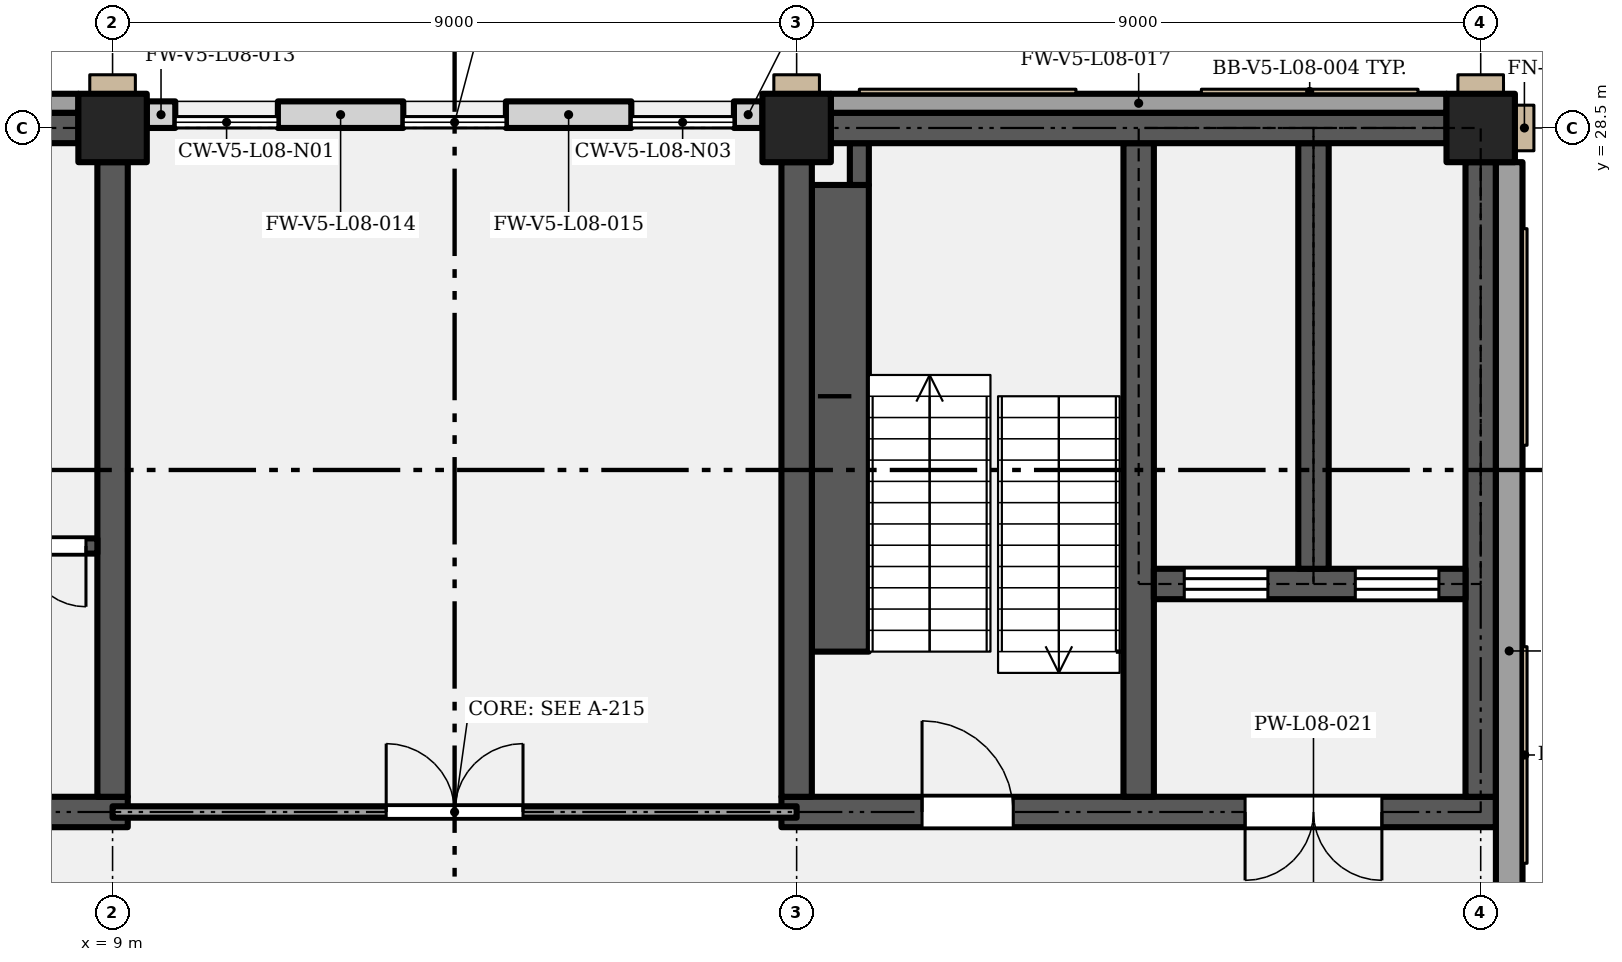
"""IFC4 building model, lengths in metres.
Left out: names, types, materials, properties, quantities, classifications, styles, units other than length and angle.
Written with IfcOpenShell. Run it as: python <this file> out.ifc"""

import sys

from ifc_helpers import new_model, si_unit, direction, frame, frame_2d, origin, origin_2d, place, context, subcontext, project, spatial, rectangle, extrude, element, fill, save


model = new_model("IFC4")
c1 = context("Model", 3, precision=1e-05, world=origin(), true_north=direction((0.0, 1.0)))
c2 = subcontext(c1, "Body", "Model", "MODEL_VIEW")
j1 = project(units=[si_unit("LENGTHUNIT", "METRE"), si_unit("PLANEANGLEUNIT", "RADIAN")], contexts=[c1])
p1 = place(None, origin())
s1 = spatial("IfcSite", under=j1, at=p1, CompositionType="ELEMENT")
p2 = place(p1, origin())
s2 = spatial("IfcBuilding", under=s1, at=p2, CompositionType="ELEMENT")
p3 = place(p2, frame((0.0, 0.0, 44.4)))
s3 = spatial("IfcBuildingStorey", under=s2, at=p3, CompositionType="ELEMENT", Elevation=44.4)
for number, where, z_axis, x_axis in (
    (1, (9.0, 28.5, 0.0), (0.0, 0.0, 1.0), (1.0, 0.0, 0.0)),
    (2, (18.0, 28.5, 0.0), (0.0, 0.0, 1.0), (1.0, 0.0, 0.0)),
    (3, (27.0, 28.5, 0.0), (0.0, 0.0, 1.0), (1.0, 0.0, 0.0)),
):
    element("IfcColumn", number, at=place(p3, frame(where, z_axis=z_axis, x_axis=x_axis)), inside=s3, PredefinedType="COLUMN", context=c2, shape_type="SweptSolid", body=[
        extrude(rectangle(XDim=0.9, YDim=0.9, at=origin_2d()), origin(), (0.0, 0.0, 1.0), 4.5),
    ])
p4 = place(p3, frame((-0.2, 19.5, 0.0), z_axis=(0.0, 0.0, 1.0), x_axis=(1.0, 0.0, 0.0)))
e4 = element("IfcWall", 4, at=p4, inside=s3, PredefinedType="SHEAR", context=c2, shape_type="SweptSolid", body=[
    extrude(rectangle(XDim=9.4, YDim=0.4, at=frame_2d((4.7, 0.0))), origin(), (0.0, 0.0, 1.0), 4.25),
])
p5 = place(p4, frame((1.85, 0.0, 0.0)))
e5 = element("IfcOpeningElement", 5, at=p5, cuts=e4, PredefinedType="OPENING", context=c2, shape_type="SweptSolid", body=[
    extrude(rectangle(XDim=1.2, YDim=2.1, at=frame_2d((0.6, 1.05))), frame((0.0, 0.21, 0.0), z_axis=(0.0, -1.0, 0.0), x_axis=(1.0, 0.0, 0.0)), (0.0, 0.0, 1.0), 0.42),
])
p6 = place(p4, frame((6.35, 0.0, 0.0)))
e6 = element("IfcOpeningElement", 6, at=p6, cuts=e4, PredefinedType="OPENING", context=c2, shape_type="SweptSolid", body=[
    extrude(rectangle(XDim=1.2, YDim=2.1, at=frame_2d((0.6, 1.05))), frame((0.0, 0.21, 0.0), z_axis=(0.0, -1.0, 0.0), x_axis=(1.0, 0.0, 0.0)), (0.0, 0.0, 1.0), 0.42),
])
p7 = place(p3, frame((17.8, 19.5, 0.0), z_axis=(0.0, 0.0, 1.0), x_axis=(1.0, 0.0, 0.0)))
e7 = element("IfcWall", 7, at=p7, inside=s3, PredefinedType="SHEAR", context=c2, shape_type="SweptSolid", body=[
    extrude(rectangle(XDim=9.4, YDim=0.4, at=frame_2d((4.7, 0.0))), origin(), (0.0, 0.0, 1.0), 4.25),
])
p8 = place(p7, frame((1.85, 0.0, 0.0)))
e8 = element("IfcOpeningElement", 8, at=p8, cuts=e7, PredefinedType="OPENING", context=c2, shape_type="SweptSolid", body=[
    extrude(rectangle(XDim=1.2, YDim=2.1, at=frame_2d((0.6, 1.05))), frame((0.0, 0.21, 0.0), z_axis=(0.0, -1.0, 0.0), x_axis=(1.0, 0.0, 0.0)), (0.0, 0.0, 1.0), 0.42),
])
p9 = place(p7, frame((7.9, 0.0, 0.0), z_axis=(0.0, 0.0, 1.0), x_axis=(-1.0, 0.0, 0.0)))
e9 = element("IfcOpeningElement", 9, at=p9, cuts=e7, PredefinedType="OPENING", context=c2, shape_type="SweptSolid", body=[
    extrude(rectangle(XDim=1.8, YDim=2.1, at=frame_2d((0.9, 1.05))), frame((0.0, 0.21, 0.0), z_axis=(0.0, -1.0, 0.0), x_axis=(1.0, 0.0, 0.0)), (0.0, 0.0, 1.0), 0.42),
])
for number, where, z_axis, x_axis in (
    (10, (9.0, 19.7, 0.0), (0.0, 0.0, 1.0), (0.0, 1.0, 0.0)),
    (11, (18.0, 19.7, 0.0), (0.0, 0.0, 1.0), (0.0, 1.0, 0.0)),
):
    element("IfcWall", number, at=place(p3, frame(where, z_axis=z_axis, x_axis=x_axis)), inside=s3, PredefinedType="SHEAR", context=c2, shape_type="SweptSolid", body=[
        extrude(rectangle(XDim=8.35, YDim=0.4, at=frame_2d((4.175, 0.0))), origin(), (0.0, 0.0, 1.0), 4.25),
    ])
p10 = place(p3, frame((22.5, 19.7, 0.0), z_axis=(0.0, 0.0, 1.0), x_axis=(0.0, 1.0, 0.0)))
e12 = element("IfcWall", 12, at=p10, inside=s3, PredefinedType="SHEAR", context=c2, shape_type="SweptSolid", body=[
    extrude(rectangle(XDim=8.6, YDim=0.4, at=frame_2d((4.3, 0.0))), origin(), (0.0, 0.0, 1.0), 4.25),
])
p11 = place(p3, frame((27.0, 19.7, 0.0), z_axis=(0.0, 0.0, 1.0), x_axis=(0.0, 1.0, 0.0)))
e13 = element("IfcWall", 13, at=p11, inside=s3, PredefinedType="SHEAR", context=c2, shape_type="SweptSolid", body=[
    extrude(rectangle(XDim=8.35, YDim=0.4, at=frame_2d((4.175, 0.0))), origin(), (0.0, 0.0, 1.0), 4.25),
])
p12 = place(p3, frame((22.7, 22.5, 0.0), z_axis=(0.0, 0.0, 1.0), x_axis=(1.0, 0.0, 0.0)))
e14 = element("IfcWall", 14, at=p12, inside=s3, PredefinedType="SHEAR", context=c2, shape_type="SweptSolid", body=[
    extrude(rectangle(XDim=4.1, YDim=0.4, at=frame_2d((2.05, 0.0))), origin(), (0.0, 0.0, 1.0), 4.25),
])
p13 = place(p12, frame((0.4, 0.0, 0.0)))
e15 = element("IfcOpeningElement", 15, at=p13, cuts=e14, PredefinedType="OPENING", context=c2, shape_type="SweptSolid", body=[
    extrude(rectangle(XDim=1.1, YDim=2.1, at=frame_2d((0.55, 1.05))), frame((0.0, 0.21, 0.0), z_axis=(0.0, -1.0, 0.0), x_axis=(1.0, 0.0, 0.0)), (0.0, 0.0, 1.0), 0.42),
])
p14 = place(p12, frame((2.65, 0.0, 0.0)))
e16 = element("IfcOpeningElement", 16, at=p14, cuts=e14, PredefinedType="OPENING", context=c2, shape_type="SweptSolid", body=[
    extrude(rectangle(XDim=1.1, YDim=2.1, at=frame_2d((0.55, 1.05))), frame((0.0, 0.21, 0.0), z_axis=(0.0, -1.0, 0.0), x_axis=(1.0, 0.0, 0.0)), (0.0, 0.0, 1.0), 0.42),
])
p15 = place(p3, frame((24.8, 22.7, 0.0), z_axis=(0.0, 0.0, 1.0), x_axis=(0.0, 1.0, 0.0)))
e17 = element("IfcWall", 17, at=p15, inside=s3, PredefinedType="SHEAR", context=c2, shape_type="SweptSolid", body=[
    extrude(rectangle(XDim=5.6, YDim=0.4, at=frame_2d((2.8, 0.0))), origin(), (0.0, 0.0, 1.0), 4.25),
])
for number, where, z_axis, x_axis in (
    (18, (0.45, 28.5, 0.0), (0.0, 0.0, 1.0), (1.0, 0.0, 0.0)),
    (19, (18.45, 28.5, 0.0), (0.0, 0.0, 1.0), (1.0, 0.0, 0.0)),
):
    element("IfcWall", number, at=place(p3, frame(where, z_axis=z_axis, x_axis=x_axis)), inside=s3, PredefinedType="SHEAR", context=c2, shape_type="SweptSolid", body=[
        extrude(rectangle(XDim=8.1, YDim=0.4, at=frame_2d((4.05, 0.0))), origin(), (0.0, 0.0, 1.0), 4.25),
    ])
p16 = place(p3, frame((0.45, 28.825, 0.0), z_axis=(0.0, 0.0, 1.0), x_axis=(1.0, 0.0, 0.0)))
e20 = element("IfcWall", 20, at=p16, inside=s3, PredefinedType="SOLIDWALL", context=c2, shape_type="SweptSolid", body=[
    extrude(rectangle(XDim=8.1, YDim=0.25, at=frame_2d((4.05, 0.0))), origin(), (0.0, 0.0, 1.0), 4.25),
])
p17 = place(p3, frame((9.45, 28.675, 0.0), z_axis=(0.0, 0.0, 1.0), x_axis=(1.0, 0.0, 0.0)))
e21 = element("IfcWall", 21, at=p17, inside=s3, PredefinedType="SOLIDWALL", context=c2, shape_type="SweptSolid", body=[
    extrude(rectangle(XDim=0.375, YDim=0.35, at=frame_2d((0.188, 0.0))), origin(), (0.0, 0.0, 1.0), 4.25),
])
for number, where, z_axis, x_axis in (
    (22, (11.175, 28.675, 0.0), (0.0, 0.0, 1.0), (1.0, 0.0, 0.0)),
    (23, (14.175, 28.675, 0.0), (0.0, 0.0, 1.0), (1.0, 0.0, 0.0)),
):
    element("IfcWall", number, at=place(p3, frame(where, z_axis=z_axis, x_axis=x_axis)), inside=s3, PredefinedType="SOLIDWALL", context=c2, shape_type="SweptSolid", body=[
        extrude(rectangle(XDim=1.65, YDim=0.35, at=frame_2d((0.825, 0.0))), origin(), (0.0, 0.0, 1.0), 4.25),
    ])
p18 = place(p3, frame((17.175, 28.675, 0.0), z_axis=(0.0, 0.0, 1.0), x_axis=(1.0, 0.0, 0.0)))
e24 = element("IfcWall", 24, at=p18, inside=s3, PredefinedType="SOLIDWALL", context=c2, shape_type="SweptSolid", body=[
    extrude(rectangle(XDim=0.375, YDim=0.35, at=frame_2d((0.188, 0.0))), origin(), (0.0, 0.0, 1.0), 4.25),
])
p19 = place(p3, frame((18.45, 28.825, 0.0), z_axis=(0.0, 0.0, 1.0), x_axis=(1.0, 0.0, 0.0)))
e25 = element("IfcWall", 25, at=p19, inside=s3, PredefinedType="SOLIDWALL", context=c2, shape_type="SweptSolid", body=[
    extrude(rectangle(XDim=8.1, YDim=0.25, at=frame_2d((4.05, 0.0))), origin(), (0.0, 0.0, 1.0), 4.25),
])
p20 = place(p3, frame((27.375, 15.188, 0.0), z_axis=(0.0, 0.0, 1.0), x_axis=(0.0, 1.0, 0.0)))
e26 = element("IfcWall", 26, at=p20, inside=s3, PredefinedType="SOLIDWALL", context=c2, shape_type="SweptSolid", body=[
    extrude(rectangle(XDim=12.863, YDim=0.35, at=frame_2d((6.431, 0.0))), origin(), (0.0, 0.0, 1.0), 4.25),
])
p21 = place(p3, frame((9.0, 19.5, 0.0), z_axis=(0.0, 0.0, 1.0), x_axis=(1.0, 0.0, 0.0)))
e27 = element("IfcWall", 27, at=p21, inside=s3, PredefinedType="PARTITIONING", context=c2, shape_type="SweptSolid", body=[
    extrude(rectangle(XDim=9.0, YDim=0.15, at=frame_2d((4.5, 0.0))), origin(), (0.0, 0.0, 1.0), 4.25),
])
p22 = place(p21, frame((3.6, 0.0, 0.0)))
e28 = element("IfcOpeningElement", 28, at=p22, cuts=e27, PredefinedType="OPENING", context=c2, shape_type="SweptSolid", body=[
    extrude(rectangle(XDim=1.8, YDim=2.1, at=frame_2d((0.9, 1.05))), frame((0.0, 0.085, 0.0), z_axis=(0.0, -1.0, 0.0), x_axis=(1.0, 0.0, 0.0)), (0.0, 0.0, 1.0), 0.17),
])
p23 = place(p3, frame((7.5, 23.0, 0.0), z_axis=(0.0, 0.0, 1.0), x_axis=(1.0, 0.0, 0.0)))
e29 = element("IfcWall", 29, at=p23, inside=s3, PredefinedType="SHEAR", context=c2, shape_type="SweptSolid", body=[
    extrude(rectangle(XDim=1.3, YDim=0.2, at=frame_2d((0.65, 0.0))), origin(), (0.0, 0.0, 1.0), 4.25),
])
p24 = place(p23, frame((1.15, 0.0, 0.0), z_axis=(0.0, 0.0, 1.0), x_axis=(-1.0, 0.0, 0.0)))
e30 = element("IfcOpeningElement", 30, at=p24, cuts=e29, PredefinedType="OPENING", context=c2, shape_type="SweptSolid", body=[
    extrude(rectangle(XDim=0.8, YDim=2.0, at=frame_2d((0.4, 1.0))), frame((0.0, 0.11, 0.0), z_axis=(0.0, -1.0, 0.0), x_axis=(1.0, 0.0, 0.0)), (0.0, 0.0, 1.0), 0.22),
])
p25 = place(p3, frame((18.575, 21.61, 0.0), z_axis=(0.0, 0.0, 1.0), x_axis=(0.0, 1.0, 0.0)))
e31 = element("IfcWall", 31, at=p25, inside=s3, PredefinedType="SHEAR", context=c2, shape_type="SweptSolid", body=[
    extrude(rectangle(XDim=6.14, YDim=0.75, at=frame_2d((3.07, 0.0))), origin(), (0.0, 0.0, 1.0), 2.05),
])
p26 = place(p3, frame((18.825, 27.75, 0.0), z_axis=(0.0, 0.0, 1.0), x_axis=(0.0, 1.0, 0.0)))
e32 = element("IfcWall", 32, at=p26, inside=s3, PredefinedType="SHEAR", context=c2, shape_type="SweptSolid", body=[
    extrude(rectangle(XDim=0.55, YDim=0.25, at=frame_2d((0.275, 0.0))), origin(), (0.0, 0.0, 1.0), 2.05),
])
p27 = place(p24, origin())
e33 = element("IfcDoor", 33, at=p27, inside=s3, OperationType="SINGLE_SWING_LEFT", PredefinedType="DOOR", context=c2, shape_type="SweptSolid", body=[
    extrude(rectangle(XDim=0.8, YDim=2.0, at=frame_2d((0.4, 1.0))), frame((0.0, 0.025, 0.0), z_axis=(0.0, -1.0, 0.0), x_axis=(1.0, 0.0, 0.0)), (0.0, 0.0, 1.0), 0.05),
])
fill(e30, e33)
p28 = place(p8, origin())
e34 = element("IfcDoor", 34, at=p28, inside=s3, OperationType="SINGLE_SWING_LEFT", PredefinedType="DOOR", context=c2, shape_type="SweptSolid", body=[
    extrude(rectangle(XDim=1.2, YDim=2.1, at=frame_2d((0.6, 1.05))), frame((0.0, 0.025, 0.0), z_axis=(0.0, -1.0, 0.0), x_axis=(1.0, 0.0, 0.0)), (0.0, 0.0, 1.0), 0.05),
])
fill(e8, e34)
p29 = place(p9, origin())
e35 = element("IfcDoor", 35, at=p29, inside=s3, OperationType="DOUBLE_DOOR_SINGLE_SWING", PredefinedType="DOOR", context=c2, shape_type="SweptSolid", body=[
    extrude(rectangle(XDim=1.8, YDim=2.1, at=frame_2d((0.9, 1.05))), frame((0.0, 0.025, 0.0), z_axis=(0.0, -1.0, 0.0), x_axis=(1.0, 0.0, 0.0)), (0.0, 0.0, 1.0), 0.05),
])
fill(e9, e35)
p30 = place(p13, origin())
e36 = element("IfcDoor", 36, at=p30, inside=s3, OperationType="SLIDING_TO_LEFT", PredefinedType="DOOR", context=c2, shape_type="SweptSolid", body=[
    extrude(rectangle(XDim=1.1, YDim=2.1, at=frame_2d((0.55, 1.05))), frame((0.0, 0.025, 0.0), z_axis=(0.0, -1.0, 0.0), x_axis=(1.0, 0.0, 0.0)), (0.0, 0.0, 1.0), 0.05),
])
fill(e15, e36)
p31 = place(p14, origin())
e37 = element("IfcDoor", 37, at=p31, inside=s3, OperationType="SLIDING_TO_LEFT", PredefinedType="DOOR", context=c2, shape_type="SweptSolid", body=[
    extrude(rectangle(XDim=1.1, YDim=2.1, at=frame_2d((0.55, 1.05))), frame((0.0, 0.025, 0.0), z_axis=(0.0, -1.0, 0.0), x_axis=(1.0, 0.0, 0.0)), (0.0, 0.0, 1.0), 0.05),
])
fill(e16, e37)
p32 = place(p22, origin())
e38 = element("IfcDoor", 38, at=p32, inside=s3, OperationType="DOUBLE_DOOR_SINGLE_SWING", PredefinedType="DOOR", context=c2, shape_type="SweptSolid", body=[
    extrude(rectangle(XDim=1.8, YDim=2.1, at=frame_2d((0.9, 1.05))), frame((0.0, 0.025, 0.0), z_axis=(0.0, -1.0, 0.0), x_axis=(1.0, 0.0, 0.0)), (0.0, 0.0, 1.0), 0.05),
])
fill(e28, e38)
save(model, sys.argv[1])
